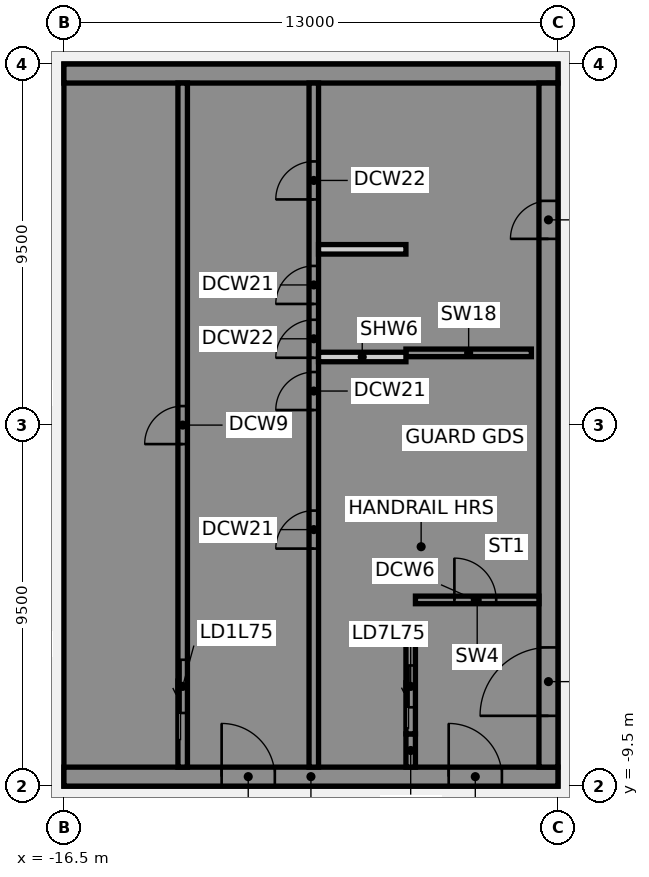
"""IFC4 building model, lengths in metres.
Left out: names, types, materials, properties, quantities, classifications, styles, units other than length and angle.
Written with IfcOpenShell. Run it as: python <this file> out.ifc"""

import sys

from ifc_helpers import new_model, si_unit, direction, frame, frame_2d, origin, place, context, subcontext, project, spatial, polyline, rectangle, outline, extrude, element, fill, save


model = new_model("IFC4")
c1 = context("Model", 3, precision=1e-05, world=origin(), true_north=direction((0.0, 1.0)))
c2 = subcontext(c1, "Body", "Model", "MODEL_VIEW")
j1 = project(units=[si_unit("LENGTHUNIT", "METRE"), si_unit("PLANEANGLEUNIT", "RADIAN")], contexts=[c1])
p1 = place(None, origin())
s1 = spatial("IfcSite", under=j1, at=p1, CompositionType="ELEMENT")
p2 = place(p1, origin())
s2 = spatial("IfcBuilding", under=s1, at=p2, CompositionType="ELEMENT")
p3 = place(p2, frame((0.0, 0.0, 305.4)))
s3 = spatial("IfcBuildingStorey", under=s2, at=p3, CompositionType="ELEMENT", Elevation=305.4)
p4 = place(p3, frame((-16.5, -9.25, 0.0), z_axis=(0.0, 0.0, 1.0), x_axis=(1.0, 0.0, 0.0)))
e1 = element("IfcWall", 1, at=p4, inside=s3, PredefinedType="SHEAR", context=c2, shape_type="SweptSolid", body=[
    extrude(rectangle(XDim=13.0, YDim=0.5, at=frame_2d((6.5, 0.0))), origin(), (0.0, 0.0, 1.0), 3.82),
])
p5 = place(p4, frame((4.15, 0.0, 0.0)))
e2 = element("IfcOpeningElement", 2, at=p5, cuts=e1, PredefinedType="OPENING", context=c2, shape_type="SweptSolid", body=[
    extrude(rectangle(XDim=1.4, YDim=2.1, at=frame_2d((0.7, 1.05))), frame((0.0, 0.26, 0.0), z_axis=(0.0, -1.0, 0.0), x_axis=(1.0, 0.0, 0.0)), (0.0, 0.0, 1.0), 0.52),
])
p6 = place(p4, frame((10.125, 0.0, 0.0)))
e3 = element("IfcOpeningElement", 3, at=p6, cuts=e1, PredefinedType="OPENING", context=c2, shape_type="SweptSolid", body=[
    extrude(rectangle(XDim=1.4, YDim=2.1, at=frame_2d((0.7, 1.05))), frame((0.0, 0.26, 0.0), z_axis=(0.0, -1.0, 0.0), x_axis=(1.0, 0.0, 0.0)), (0.0, 0.0, 1.0), 0.52),
])
p7 = place(p3, origin())
e4 = element("IfcWall", 4, at=p7, inside=s3, PredefinedType="SHEAR", context=c2, shape_type="SweptSolid", body=[
    extrude(outline(polyline([(-13.5, -8.125), (-16.0, -8.125), (-16.0, -5.625), (-13.5, -5.625), (-13.5, -5.375), (-16.0, -5.375), (-16.0, 5.375), (-13.5, 5.375), (-13.5, 5.625), (-16.0, 5.625), (-16.0, 8.125), (-13.5, 8.125), (-13.5, 9.0), (-16.0, 9.0), (-16.5, 9.0), (-16.5, -9.0), (-16.0, -9.0), (-13.5, -9.0), (-13.5, -8.125)])), origin(), (0.0, 0.0, 1.0), 3.82),
])
p8 = place(p3, frame((-16.5, 9.25, 0.0), z_axis=(0.0, 0.0, 1.0), x_axis=(1.0, 0.0, 0.0)))
e5 = element("IfcWall", 5, at=p8, inside=s3, PredefinedType="SHEAR", context=c2, shape_type="SweptSolid", body=[
    extrude(rectangle(XDim=13.0, YDim=0.5, at=frame_2d((6.5, 0.0))), origin(), (0.0, 0.0, 1.0), 3.82),
])
p9 = place(p3, origin())
e6 = element("IfcWall", 6, at=p9, inside=s3, PredefinedType="SHEAR", context=c2, shape_type="SweptSolid", body=[
    extrude(outline(polyline([(-9.8, -5.625), (-7.5, -5.625), (-7.25, -5.625), (-7.25, 9.0), (-7.5, 9.0), (-9.8, 9.0), (-9.8, 8.125), (-7.5, 8.125), (-7.5, -5.375), (-9.8, -5.375), (-9.8, -5.625)])), origin(), (0.0, 0.0, 1.0), 3.82),
])
p10 = place(p3, origin())
e7 = element("IfcWall", 7, at=p10, inside=s3, PredefinedType="SHEAR", context=c2, shape_type="SweptSolid", body=[
    extrude(outline(polyline([(-7.5, -8.125), (-9.55, -8.125), (-9.55, -5.625), (-9.8, -5.625), (-9.8, -8.125), (-9.8, -9.0), (-7.5, -9.0), (-7.5, -8.125)])), origin(), (0.0, 0.0, 1.0), 3.82),
])
p11 = place(p3, frame((-7.375, -9.0, 0.0), z_axis=(0.0, 0.0, 1.0), x_axis=(0.0, 1.0, 0.0)))
e8 = element("IfcWall", 8, at=p11, inside=s3, PredefinedType="SHEAR", context=c2, shape_type="SweptSolid", body=[
    extrude(rectangle(XDim=0.875, YDim=0.25, at=frame_2d((0.438, 0.0))), origin(), (0.0, 0.0, 1.0), 3.82),
])
p12 = place(p3, frame((-7.5, 1.9, 0.0), z_axis=(0.0, 0.0, 1.0), x_axis=(1.0, 0.0, 0.0)))
e9 = element("IfcWall", 9, at=p12, inside=s3, PredefinedType="SHEAR", context=c2, shape_type="SweptSolid", body=[
    extrude(rectangle(XDim=3.3, YDim=0.2, at=frame_2d((1.65, 0.0))), origin(), (0.0, 0.0, 1.0), 3.82),
])
p13 = place(p3, frame((-13.375, -9.0, 0.0), z_axis=(0.0, 0.0, 1.0), x_axis=(0.0, 1.0, 0.0)))
e10 = element("IfcWall", 10, at=p13, inside=s3, PredefinedType="SHEAR", context=c2, shape_type="SweptSolid", body=[
    extrude(rectangle(XDim=18.0, YDim=0.25, at=frame_2d((9.0, 0.0))), origin(), (0.0, 0.0, 1.0), 3.82),
])
p14 = place(p13, frame((1.425, 0.0, 0.0)))
e11 = element("IfcOpeningElement", 11, at=p14, cuts=e10, PredefinedType="OPENING", context=c2, shape_type="SweptSolid", body=[
    extrude(rectangle(XDim=1.4, YDim=2.1, at=frame_2d((0.7, 1.05))), frame((0.0, 0.135, 0.0), z_axis=(0.0, -1.0, 0.0), x_axis=(1.0, 0.0, 0.0)), (0.0, 0.0, 1.0), 0.27),
])
p15 = place(p13, frame((8.5, 0.0, 0.0)))
e12 = element("IfcOpeningElement", 12, at=p15, cuts=e10, PredefinedType="OPENING", context=c2, shape_type="SweptSolid", body=[
    extrude(rectangle(XDim=1.0, YDim=2.1, at=frame_2d((0.5, 1.05))), frame((0.0, 0.135, 0.0), z_axis=(0.0, -1.0, 0.0), x_axis=(1.0, 0.0, 0.0)), (0.0, 0.0, 1.0), 0.27),
])
p16 = place(p3, frame((-9.925, -9.0, 0.0), z_axis=(0.0, 0.0, 1.0), x_axis=(0.0, 1.0, 0.0)))
e13 = element("IfcWall", 13, at=p16, inside=s3, PredefinedType="SHEAR", context=c2, shape_type="SweptSolid", body=[
    extrude(rectangle(XDim=18.0, YDim=0.25, at=frame_2d((9.0, 0.0))), origin(), (0.0, 0.0, 1.0), 3.82),
])
p17 = place(p16, frame((5.75, 0.0, 0.0)))
e14 = element("IfcOpeningElement", 14, at=p17, cuts=e13, PredefinedType="OPENING", context=c2, shape_type="SweptSolid", body=[
    extrude(rectangle(XDim=1.0, YDim=2.1, at=frame_2d((0.5, 1.05))), frame((0.0, 0.135, 0.0), z_axis=(0.0, -1.0, 0.0), x_axis=(1.0, 0.0, 0.0)), (0.0, 0.0, 1.0), 0.27),
])
p18 = place(p16, frame((9.396, 0.0, 0.0)))
e15 = element("IfcOpeningElement", 15, at=p18, cuts=e13, PredefinedType="OPENING", context=c2, shape_type="SweptSolid", body=[
    extrude(rectangle(XDim=1.0, YDim=2.1, at=frame_2d((0.5, 1.05))), frame((0.0, 0.135, 0.0), z_axis=(0.0, -1.0, 0.0), x_axis=(1.0, 0.0, 0.0)), (0.0, 0.0, 1.0), 0.27),
])
p19 = place(p16, frame((10.771, 0.0, 0.0)))
e16 = element("IfcOpeningElement", 16, at=p19, cuts=e13, PredefinedType="OPENING", context=c2, shape_type="SweptSolid", body=[
    extrude(rectangle(XDim=1.0, YDim=2.1, at=frame_2d((0.5, 1.05))), frame((0.0, 0.135, 0.0), z_axis=(0.0, -1.0, 0.0), x_axis=(1.0, 0.0, 0.0)), (0.0, 0.0, 1.0), 0.27),
])
p20 = place(p16, frame((12.188, 0.0, 0.0)))
e17 = element("IfcOpeningElement", 17, at=p20, cuts=e13, PredefinedType="OPENING", context=c2, shape_type="SweptSolid", body=[
    extrude(rectangle(XDim=1.0, YDim=2.1, at=frame_2d((0.5, 1.05))), frame((0.0, 0.135, 0.0), z_axis=(0.0, -1.0, 0.0), x_axis=(1.0, 0.0, 0.0)), (0.0, 0.0, 1.0), 0.27),
])
p21 = place(p16, frame((14.938, 0.0, 0.0)))
e18 = element("IfcOpeningElement", 18, at=p21, cuts=e13, PredefinedType="OPENING", context=c2, shape_type="SweptSolid", body=[
    extrude(rectangle(XDim=1.0, YDim=2.1, at=frame_2d((0.5, 1.05))), frame((0.0, 0.135, 0.0), z_axis=(0.0, -1.0, 0.0), x_axis=(1.0, 0.0, 0.0)), (0.0, 0.0, 1.0), 0.27),
])
p22 = place(p3, frame((-7.375, -8.125, 0.0), z_axis=(0.0, 0.0, 1.0), x_axis=(0.0, 1.0, 0.0)))
e19 = element("IfcWall", 19, at=p22, inside=s3, PredefinedType="SHEAR", context=c2, shape_type="SweptSolid", body=[
    extrude(rectangle(XDim=2.5, YDim=0.25, at=frame_2d((1.25, 0.0))), origin(), (0.0, 0.0, 1.0), 3.82),
])
p23 = place(p22, frame((0.7, 0.0, 0.0)))
e20 = element("IfcOpeningElement", 20, at=p23, cuts=e19, PredefinedType="OPENING", context=c2, shape_type="SweptSolid", body=[
    extrude(rectangle(XDim=1.1, YDim=2.1, at=frame_2d((0.55, 1.05))), frame((0.0, 0.135, 0.0), z_axis=(0.0, -1.0, 0.0), x_axis=(1.0, 0.0, 0.0)), (0.0, 0.0, 1.0), 0.27),
])
p24 = place(p3, frame((-3.75, -9.0, 0.0), z_axis=(0.0, 0.0, 1.0), x_axis=(0.0, 1.0, 0.0)))
e21 = element("IfcWall", 21, at=p24, inside=s3, PredefinedType="SHEAR", context=c2, shape_type="SweptSolid", body=[
    extrude(rectangle(XDim=18.0, YDim=0.5, at=frame_2d((9.0, 0.0))), origin(), (0.0, 0.0, 1.0), 3.82),
])
p25 = place(p24, frame((1.35, 0.0, 0.0)))
e22 = element("IfcOpeningElement", 22, at=p25, cuts=e21, PredefinedType="OPENING", context=c2, shape_type="SweptSolid", body=[
    extrude(rectangle(XDim=1.8, YDim=2.1, at=frame_2d((0.9, 1.05))), frame((0.0, 0.26, 0.0), z_axis=(0.0, -1.0, 0.0), x_axis=(1.0, 0.0, 0.0)), (0.0, 0.0, 1.0), 0.52),
])
p26 = place(p24, frame((13.9, 0.0, 0.0)))
e23 = element("IfcOpeningElement", 23, at=p26, cuts=e21, PredefinedType="OPENING", context=c2, shape_type="SweptSolid", body=[
    extrude(rectangle(XDim=1.0, YDim=2.1, at=frame_2d((0.5, 1.05))), frame((0.0, 0.26, 0.0), z_axis=(0.0, -1.0, 0.0), x_axis=(1.0, 0.0, 0.0)), (0.0, 0.0, 1.0), 0.52),
])
p27 = place(p3, frame((-7.25, -4.6, 0.0), z_axis=(0.0, 0.0, 1.0), x_axis=(1.0, 0.0, 0.0)))
e24 = element("IfcWall", 24, at=p27, inside=s3, PredefinedType="SHEAR", context=c2, shape_type="SweptSolid", body=[
    extrude(rectangle(XDim=3.25, YDim=0.2, at=frame_2d((1.625, 0.0))), origin(), (0.0, 0.0, 1.0), 3.82),
])
p28 = place(p27, frame((1.025, 0.0, 0.0)))
e25 = element("IfcOpeningElement", 25, at=p28, cuts=e24, PredefinedType="OPENING", context=c2, shape_type="SweptSolid", body=[
    extrude(rectangle(XDim=1.1, YDim=2.1, at=frame_2d((0.55, 1.05))), frame((0.0, 0.11, 0.0), z_axis=(0.0, -1.0, 0.0), x_axis=(1.0, 0.0, 0.0)), (0.0, 0.0, 1.0), 0.22),
])
for number, where, z_axis, x_axis in (
    (26, (-9.8, 1.792, 0.0), (0.0, 0.0, 1.0), (1.0, 0.0, 0.0)),
    (27, (-9.8, 4.625, 0.0), (0.0, 0.0, 1.0), (1.0, 0.0, 0.0)),
):
    element("IfcWall", number, at=place(p3, frame(where, z_axis=z_axis, x_axis=x_axis)), inside=s3, PredefinedType="PARTITIONING", context=c2, shape_type="SweptSolid", body=[
        extrude(rectangle(XDim=2.3, YDim=0.25, at=frame_2d((1.15, 0.0))), origin(), (0.0, 0.0, 1.0), 3.82),
    ])
p29 = place(p5, origin())
e28 = element("IfcDoor", 28, at=p29, inside=s3, OperationType="SINGLE_SWING_LEFT", PredefinedType="DOOR", context=c2, shape_type="SweptSolid", body=[
    extrude(rectangle(XDim=1.4, YDim=2.1, at=frame_2d((0.7, 1.05))), frame((0.0, 0.025, 0.0), z_axis=(0.0, -1.0, 0.0), x_axis=(1.0, 0.0, 0.0)), (0.0, 0.0, 1.0), 0.05),
])
fill(e2, e28)
p30 = place(p6, origin())
e29 = element("IfcDoor", 29, at=p30, inside=s3, OperationType="SINGLE_SWING_LEFT", PredefinedType="DOOR", context=c2, shape_type="SweptSolid", body=[
    extrude(rectangle(XDim=1.4, YDim=2.1, at=frame_2d((0.7, 1.05))), frame((0.0, 0.025, 0.0), z_axis=(0.0, -1.0, 0.0), x_axis=(1.0, 0.0, 0.0)), (0.0, 0.0, 1.0), 0.05),
])
fill(e3, e29)
p31 = place(p25, origin())
e30 = element("IfcDoor", 30, at=p31, inside=s3, OperationType="SINGLE_SWING_LEFT", PredefinedType="DOOR", context=c2, shape_type="SweptSolid", body=[
    extrude(rectangle(XDim=1.8, YDim=2.1, at=frame_2d((0.9, 1.05))), frame((0.0, 0.025, 0.0), z_axis=(0.0, -1.0, 0.0), x_axis=(1.0, 0.0, 0.0)), (0.0, 0.0, 1.0), 0.05),
])
fill(e22, e30)
p32 = place(p26, origin())
e31 = element("IfcDoor", 31, at=p32, inside=s3, OperationType="SINGLE_SWING_LEFT", PredefinedType="DOOR", context=c2, shape_type="SweptSolid", body=[
    extrude(rectangle(XDim=1.0, YDim=2.1, at=frame_2d((0.5, 1.05))), frame((0.0, 0.025, 0.0), z_axis=(0.0, -1.0, 0.0), x_axis=(1.0, 0.0, 0.0)), (0.0, 0.0, 1.0), 0.05),
])
fill(e23, e31)
p33 = place(p28, origin())
e32 = element("IfcDoor", 32, at=p33, inside=s3, OperationType="SINGLE_SWING_LEFT", PredefinedType="DOOR", context=c2, shape_type="SweptSolid", body=[
    extrude(rectangle(XDim=1.1, YDim=2.1, at=frame_2d((0.55, 1.05))), frame((0.0, 0.025, 0.0), z_axis=(0.0, -1.0, 0.0), x_axis=(1.0, 0.0, 0.0)), (0.0, 0.0, 1.0), 0.05),
])
fill(e25, e32)
p34 = place(p14, origin())
e33 = element("IfcDoor", 33, at=p34, inside=s3, OperationType="SLIDING_TO_LEFT", PredefinedType="DOOR", context=c2, shape_type="SweptSolid", body=[
    extrude(rectangle(XDim=1.4, YDim=2.1, at=frame_2d((0.7, 1.05))), frame((0.0, 0.025, 0.0), z_axis=(0.0, -1.0, 0.0), x_axis=(1.0, 0.0, 0.0)), (0.0, 0.0, 1.0), 0.05),
])
fill(e11, e33)
p35 = place(p23, origin())
e34 = element("IfcDoor", 34, at=p35, inside=s3, OperationType="SLIDING_TO_LEFT", PredefinedType="DOOR", context=c2, shape_type="SweptSolid", body=[
    extrude(rectangle(XDim=1.1, YDim=2.1, at=frame_2d((0.55, 1.05))), frame((0.0, 0.025, 0.0), z_axis=(0.0, -1.0, 0.0), x_axis=(1.0, 0.0, 0.0)), (0.0, 0.0, 1.0), 0.05),
])
fill(e20, e34)
p36 = place(p15, origin())
e35 = element("IfcDoor", 35, at=p36, inside=s3, OperationType="SINGLE_SWING_LEFT", PredefinedType="DOOR", context=c2, shape_type="SweptSolid", body=[
    extrude(rectangle(XDim=1.0, YDim=2.1, at=frame_2d((0.5, 1.05))), frame((0.0, 0.025, 0.0), z_axis=(0.0, -1.0, 0.0), x_axis=(1.0, 0.0, 0.0)), (0.0, 0.0, 1.0), 0.05),
])
fill(e12, e35)
p37 = place(p17, origin())
e36 = element("IfcDoor", 36, at=p37, inside=s3, OperationType="SINGLE_SWING_LEFT", PredefinedType="DOOR", context=c2, shape_type="SweptSolid", body=[
    extrude(rectangle(XDim=1.0, YDim=2.1, at=frame_2d((0.5, 1.05))), frame((0.0, 0.025, 0.0), z_axis=(0.0, -1.0, 0.0), x_axis=(1.0, 0.0, 0.0)), (0.0, 0.0, 1.0), 0.05),
])
fill(e14, e36)
p38 = place(p18, origin())
e37 = element("IfcDoor", 37, at=p38, inside=s3, OperationType="SINGLE_SWING_LEFT", PredefinedType="DOOR", context=c2, shape_type="SweptSolid", body=[
    extrude(rectangle(XDim=1.0, YDim=2.1, at=frame_2d((0.5, 1.05))), frame((0.0, 0.025, 0.0), z_axis=(0.0, -1.0, 0.0), x_axis=(1.0, 0.0, 0.0)), (0.0, 0.0, 1.0), 0.05),
])
fill(e15, e37)
p39 = place(p19, origin())
e38 = element("IfcDoor", 38, at=p39, inside=s3, OperationType="SINGLE_SWING_LEFT", PredefinedType="DOOR", context=c2, shape_type="SweptSolid", body=[
    extrude(rectangle(XDim=1.0, YDim=2.1, at=frame_2d((0.5, 1.05))), frame((0.0, 0.025, 0.0), z_axis=(0.0, -1.0, 0.0), x_axis=(1.0, 0.0, 0.0)), (0.0, 0.0, 1.0), 0.05),
])
fill(e16, e38)
p40 = place(p20, origin())
e39 = element("IfcDoor", 39, at=p40, inside=s3, OperationType="SINGLE_SWING_LEFT", PredefinedType="DOOR", context=c2, shape_type="SweptSolid", body=[
    extrude(rectangle(XDim=1.0, YDim=2.1, at=frame_2d((0.5, 1.05))), frame((0.0, 0.025, 0.0), z_axis=(0.0, -1.0, 0.0), x_axis=(1.0, 0.0, 0.0)), (0.0, 0.0, 1.0), 0.05),
])
fill(e17, e39)
p41 = place(p21, origin())
e40 = element("IfcDoor", 40, at=p41, inside=s3, OperationType="SINGLE_SWING_LEFT", PredefinedType="DOOR", context=c2, shape_type="SweptSolid", body=[
    extrude(rectangle(XDim=1.0, YDim=2.1, at=frame_2d((0.5, 1.05))), frame((0.0, 0.025, 0.0), z_axis=(0.0, -1.0, 0.0), x_axis=(1.0, 0.0, 0.0)), (0.0, 0.0, 1.0), 0.05),
])
fill(e18, e40)
save(model, sys.argv[1])
